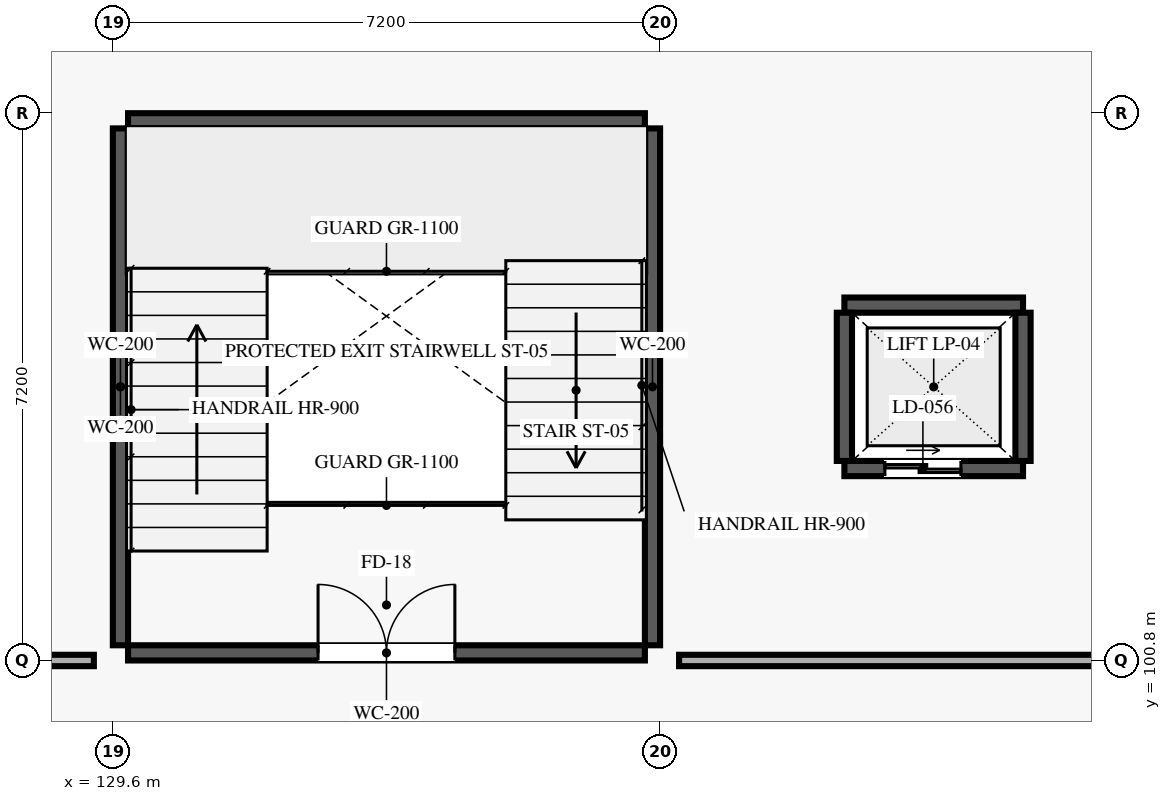
"""IFC4 building model, lengths in metres.
Left out: names, types, materials, properties, quantities, classifications, styles, units other than length and angle.
Written with IfcOpenShell. Run it as: python <this file> out.ifc"""

import sys

from ifc_helpers import new_model, si_unit, direction, frame, frame_2d, origin, place, context, subcontext, project, spatial, rectangle, extrude, element, fill, save


model = new_model("IFC4")
c1 = context("Model", 3, precision=1e-05, world=origin(), true_north=direction((0.0, 1.0)))
c2 = subcontext(c1, "Body", "Model", "MODEL_VIEW")
j1 = project(units=[si_unit("LENGTHUNIT", "METRE"), si_unit("PLANEANGLEUNIT", "RADIAN")], contexts=[c1])
p1 = place(None, origin())
s1 = spatial("IfcSite", under=j1, at=p1, CompositionType="ELEMENT")
p2 = place(p1, origin())
s2 = spatial("IfcBuilding", under=s1, at=p2, CompositionType="ELEMENT")
p3 = place(p2, frame((0.0, 0.0, 13.5)))
s3 = spatial("IfcBuildingStorey", under=s2, at=p3, CompositionType="ELEMENT", Elevation=13.5)
p4 = place(p3, frame((129.8, 100.9, 0.0), z_axis=(0.0, 0.0, 1.0), x_axis=(1.0, 0.0, 0.0)))
e1 = element("IfcWall", 1, at=p4, inside=s3, PredefinedType="SHEAR", context=c2, shape_type="SweptSolid", body=[
    extrude(rectangle(XDim=6.8, YDim=0.2, at=frame_2d((3.4, 0.0))), origin(), (0.0, 0.0, 1.0), 3.81),
])
p5 = place(p4, frame((2.5, 0.0, 0.0)))
e2 = element("IfcOpeningElement", 2, at=p5, cuts=e1, PredefinedType="OPENING", context=c2, shape_type="SweptSolid", body=[
    extrude(rectangle(XDim=1.8, YDim=2.2, at=frame_2d((0.9, 1.1))), frame((0.0, 0.11, 0.0), z_axis=(0.0, -1.0, 0.0), x_axis=(1.0, 0.0, 0.0)), (0.0, 0.0, 1.0), 0.22),
])
for number, where, z_axis, x_axis in (
    (3, (129.8, 107.9, 0.0), (0.0, 0.0, 1.0), (1.0, 0.0, 0.0)),
    (4, (129.7, 101.0, 0.0), (0.0, 0.0, 1.0), (0.0, 1.0, 0.0)),
    (5, (136.7, 101.0, 0.0), (0.0, 0.0, 1.0), (0.0, 1.0, 0.0)),
):
    element("IfcWall", number, at=place(p3, frame(where, z_axis=z_axis, x_axis=x_axis)), inside=s3, PredefinedType="SHEAR", context=c2, shape_type="SweptSolid", body=[
        extrude(rectangle(XDim=6.8, YDim=0.2, at=frame_2d((3.4, 0.0))), origin(), (0.0, 0.0, 1.0), 3.81),
    ])
p6 = place(p3, frame((139.225, 103.325, 0.0), z_axis=(0.0, 0.0, 1.0), x_axis=(1.0, 0.0, 0.0)))
e6 = element("IfcWall", 6, at=p6, inside=s3, PredefinedType="SHEAR", context=c2, shape_type="SweptSolid", body=[
    extrude(rectangle(XDim=2.35, YDim=0.2, at=frame_2d((1.175, 0.0))), origin(), (0.0, 0.0, 1.0), 3.81),
])
p7 = place(p6, frame((0.533, 0.0, 0.0)))
e7 = element("IfcOpeningElement", 7, at=p7, cuts=e6, PredefinedType="OPENING", context=c2, shape_type="SweptSolid", body=[
    extrude(rectangle(XDim=1.0, YDim=2.1, at=frame_2d((0.5, 1.05))), frame((0.0, 0.11, 0.0), z_axis=(0.0, -1.0, 0.0), x_axis=(1.0, 0.0, 0.0)), (0.0, 0.0, 1.0), 0.22),
])
p8 = place(p3, frame((139.225, 105.475, 0.0), z_axis=(0.0, 0.0, 1.0), x_axis=(1.0, 0.0, 0.0)))
e8 = element("IfcWall", 8, at=p8, inside=s3, PredefinedType="SHEAR", context=c2, shape_type="SweptSolid", body=[
    extrude(rectangle(XDim=2.35, YDim=0.2, at=frame_2d((1.175, 0.0))), origin(), (0.0, 0.0, 1.0), 3.81),
])
for number, where, z_axis, x_axis in (
    (9, (139.225, 103.425, 0.0), (0.0, 0.0, 1.0), (0.0, 1.0, 0.0)),
    (10, (141.575, 103.425, 0.0), (0.0, 0.0, 1.0), (0.0, 1.0, 0.0)),
):
    element("IfcWall", number, at=place(p3, frame(where, z_axis=z_axis, x_axis=x_axis)), inside=s3, PredefinedType="SHEAR", context=c2, shape_type="SweptSolid", body=[
        extrude(rectangle(XDim=1.95, YDim=0.2, at=frame_2d((0.975, 0.0))), origin(), (0.0, 0.0, 1.0), 3.81),
    ])
p9 = place(p3, frame((94.1, 100.8, 0.0), z_axis=(0.0, 0.0, 1.0), x_axis=(1.0, 0.0, 0.0)))
e11 = element("IfcWall", 11, at=p9, inside=s3, PredefinedType="PARTITIONING", context=c2, shape_type="SweptSolid", body=[
    extrude(rectangle(XDim=35.25, YDim=0.15, at=frame_2d((17.625, 0.0))), origin(), (0.0, 0.0, 1.0), 3.81),
])
p10 = place(p9, frame((30.891, 0.0, 0.0)))
e12 = element("IfcOpeningElement", 12, at=p10, cuts=e11, PredefinedType="OPENING", context=c2, shape_type="SweptSolid", body=[
    extrude(rectangle(XDim=2.1, YDim=2.4, at=frame_2d((1.05, 1.2))), frame((0.0, 0.085, 0.0), z_axis=(0.0, -1.0, 0.0), x_axis=(1.0, 0.0, 0.0)), (0.0, 0.0, 1.0), 0.17),
])
p11 = place(p3, frame((137.05, 100.8, 0.0), z_axis=(0.0, 0.0, 1.0), x_axis=(1.0, 0.0, 0.0)))
e13 = element("IfcWall", 13, at=p11, inside=s3, PredefinedType="PARTITIONING", context=c2, shape_type="SweptSolid", body=[
    extrude(rectangle(XDim=6.8, YDim=0.15, at=frame_2d((3.4, 0.0))), origin(), (0.0, 0.0, 1.0), 3.81),
])
p12 = place(p5, origin())
e14 = element("IfcDoor", 14, at=p12, inside=s3, OperationType="DOUBLE_DOOR_SINGLE_SWING", PredefinedType="DOOR", context=c2, shape_type="SweptSolid", body=[
    extrude(rectangle(XDim=1.8, YDim=2.2, at=frame_2d((0.9, 1.1))), frame((0.0, 0.025, 0.0), z_axis=(0.0, -1.0, 0.0), x_axis=(1.0, 0.0, 0.0)), (0.0, 0.0, 1.0), 0.05),
])
fill(e2, e14)
p13 = place(p7, origin())
e15 = element("IfcDoor", 15, at=p13, inside=s3, OperationType="DOUBLE_DOOR_SLIDING", PredefinedType="DOOR", context=c2, shape_type="SweptSolid", body=[
    extrude(rectangle(XDim=1.0, YDim=2.1, at=frame_2d((0.5, 1.05))), frame((0.0, 0.025, 0.0), z_axis=(0.0, -1.0, 0.0), x_axis=(1.0, 0.0, 0.0)), (0.0, 0.0, 1.0), 0.05),
])
fill(e7, e15)
save(model, sys.argv[1])
